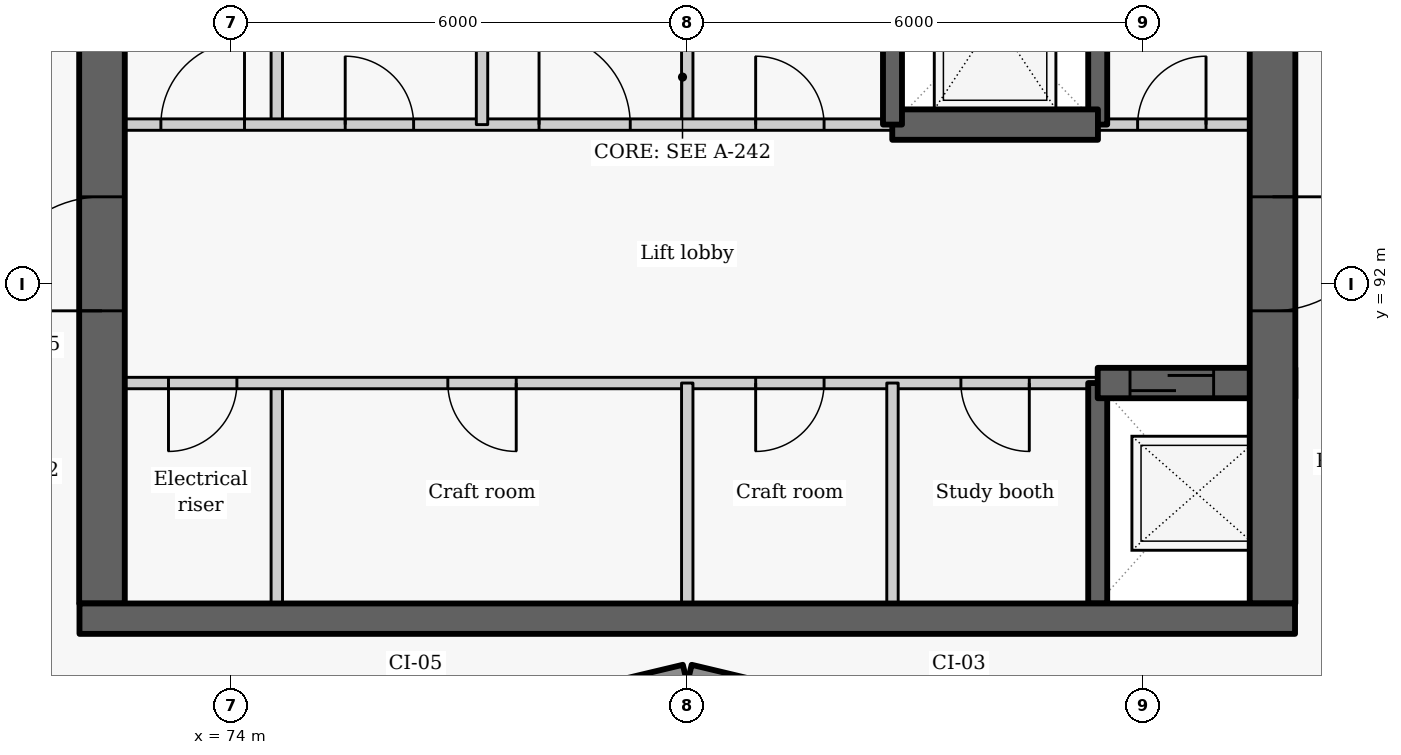
"""IFC4 building model, lengths in metres.
Left out: names, types, materials, properties, quantities, classifications, styles, units other than length and angle.
Written with IfcOpenShell. Run it as: python <this file> out.ifc"""

import sys

from ifc_helpers import new_model, si_unit, direction, frame, frame_2d, origin, place, context, subcontext, project, spatial, rectangle, extrude, element, fill, save


model = new_model("IFC4")
c1 = context("Model", 3, precision=1e-05, world=origin(), true_north=direction((0.0, 1.0)))
c2 = subcontext(c1, "Body", "Model", "MODEL_VIEW")
j1 = project(units=[si_unit("LENGTHUNIT", "METRE"), si_unit("PLANEANGLEUNIT", "RADIAN")], contexts=[c1])
p1 = place(None, origin())
s1 = spatial("IfcSite", under=j1, at=p1, CompositionType="ELEMENT")
p2 = place(p1, origin())
s2 = spatial("IfcBuilding", under=s1, at=p2, CompositionType="ELEMENT")
p3 = place(p2, frame((0.0, 0.0, 249.3)))
s3 = spatial("IfcBuildingStorey", under=s2, at=p3, CompositionType="ELEMENT", Elevation=249.3)
for number, where, z_axis, x_axis in (
    (1, (76.814, 86.119, 0.0), (0.0, 0.0, 1.0), (0.973, 0.232, 0.0)),
    (2, (80.029, 86.872, 0.0), (0.0, 0.0, 1.0), (0.973, -0.232, 0.0)),
):
    element("IfcWall", number, at=place(p3, frame(where, z_axis=z_axis, x_axis=x_axis)), inside=s3, PredefinedType="SOLIDWALL", context=c2, shape_type="SweptSolid", body=[
        extrude(rectangle(XDim=3.246, YDim=0.25, at=frame_2d((1.623, 0.0))), origin(), (0.0, 0.0, 1.0), 2.425),
    ])
p4 = place(p3, frame((74.6, 87.8, 0.0), z_axis=(0.0, 0.0, 1.0), x_axis=(0.0, 1.0, 0.0)))
e3 = element("IfcWall", 3, at=p4, inside=s3, PredefinedType="PARTITIONING", context=c2, shape_type="SweptSolid", body=[
    extrude(rectangle(XDim=2.9, YDim=0.15, at=frame_2d((1.45, 0.0))), origin(), (0.0, 0.0, 1.0), 3.025),
])
p5 = place(p3, frame((74.6, 94.1, 0.0), z_axis=(0.0, 0.0, 1.0), x_axis=(0.0, 1.0, 0.0)))
e4 = element("IfcWall", 4, at=p5, inside=s3, PredefinedType="PARTITIONING", context=c2, shape_type="SweptSolid", body=[
    extrude(rectangle(XDim=2.8, YDim=0.15, at=frame_2d((1.4, 0.0))), origin(), (0.0, 0.0, 1.0), 3.025),
])
p6 = place(p3, frame((85.4, 90.7, 0.0), z_axis=(0.0, 0.0, 1.0), x_axis=(-1.0, 0.0, 0.0)))
e5 = element("IfcWall", 5, at=p6, inside=s3, PredefinedType="PARTITIONING", context=c2, shape_type="SweptSolid", body=[
    extrude(rectangle(XDim=13.4, YDim=0.15, at=frame_2d((6.7, 0.0))), origin(), (0.0, 0.0, 1.0), 3.025),
])
p7 = place(p6, frame((11.325, 0.0, 0.0)))
e6 = element("IfcOpeningElement", 6, at=p7, cuts=e5, PredefinedType="OPENING", context=c2, shape_type="SweptSolid", body=[
    extrude(rectangle(XDim=0.9, YDim=2.1, at=frame_2d((0.45, 1.05))), frame((0.0, 0.085, 0.0), z_axis=(0.0, -1.0, 0.0), x_axis=(1.0, 0.0, 0.0)), (0.0, 0.0, 1.0), 0.17),
])
p8 = place(p6, frame((7.65, 0.0, 0.0)))
e7 = element("IfcOpeningElement", 7, at=p8, cuts=e5, PredefinedType="OPENING", context=c2, shape_type="SweptSolid", body=[
    extrude(rectangle(XDim=0.9, YDim=2.1, at=frame_2d((0.45, 1.05))), frame((0.0, 0.085, 0.0), z_axis=(0.0, -1.0, 0.0), x_axis=(1.0, 0.0, 0.0)), (0.0, 0.0, 1.0), 0.17),
])
p9 = place(p6, frame((3.6, 0.0, 0.0)))
e8 = element("IfcOpeningElement", 8, at=p9, cuts=e5, PredefinedType="OPENING", context=c2, shape_type="SweptSolid", body=[
    extrude(rectangle(XDim=0.9, YDim=2.1, at=frame_2d((0.45, 1.05))), frame((0.0, 0.085, 0.0), z_axis=(0.0, -1.0, 0.0), x_axis=(1.0, 0.0, 0.0)), (0.0, 0.0, 1.0), 0.17),
])
p10 = place(p6, frame((0.9, 0.0, 0.0)))
e9 = element("IfcOpeningElement", 9, at=p10, cuts=e5, PredefinedType="OPENING", context=c2, shape_type="SweptSolid", body=[
    extrude(rectangle(XDim=0.9, YDim=2.1, at=frame_2d((0.45, 1.05))), frame((0.0, 0.085, 0.0), z_axis=(0.0, -1.0, 0.0), x_axis=(1.0, 0.0, 0.0)), (0.0, 0.0, 1.0), 0.17),
])
p11 = place(p3, frame((72.3, 87.8, -0.275), z_axis=(0.0, 0.0, 1.0), x_axis=(0.0, 1.0, 0.0)))
e10 = element("IfcWall", 10, at=p11, inside=s3, PredefinedType="SHEAR", context=c2, shape_type="SweptSolid", body=[
    extrude(rectangle(XDim=9.1, YDim=0.6, at=frame_2d((4.55, 0.0))), origin(), (0.0, 0.0, 1.0), 3.3),
])
p12 = place(p11, frame((3.85, 0.0, 0.275)))
e11 = element("IfcOpeningElement", 11, at=p12, cuts=e10, PredefinedType="OPENING", context=c2, shape_type="SweptSolid", body=[
    extrude(rectangle(XDim=1.5, YDim=2.1, at=frame_2d((0.75, 1.05))), frame((0.0, 0.31, 0.0), z_axis=(0.0, -1.0, 0.0), x_axis=(1.0, 0.0, 0.0)), (0.0, 0.0, 1.0), 0.62),
])
p13 = place(p3, frame((85.4, 87.8, -0.275), z_axis=(0.0, 0.0, 1.0), x_axis=(0.0, 1.0, 0.0)))
e12 = element("IfcWall", 12, at=p13, inside=s3, PredefinedType="SHEAR", context=c2, shape_type="SweptSolid", body=[
    extrude(rectangle(XDim=2.9, YDim=0.25, at=frame_2d((1.45, 0.0))), origin(), (0.0, 0.0, 1.0), 3.3),
])
p14 = place(p3, frame((85.4, 94.1, -0.275), z_axis=(0.0, 0.0, 1.0), x_axis=(0.0, 1.0, 0.0)))
e13 = element("IfcWall", 13, at=p14, inside=s3, PredefinedType="SHEAR", context=c2, shape_type="SweptSolid", body=[
    extrude(rectangle(XDim=2.8, YDim=0.25, at=frame_2d((1.4, 0.0))), origin(), (0.0, 0.0, 1.0), 3.3),
])
p15 = place(p3, frame((85.4, 90.7, -0.275), z_axis=(0.0, 0.0, 1.0), x_axis=(1.0, 0.0, 0.0)))
e14 = element("IfcWall", 14, at=p15, inside=s3, PredefinedType="SHEAR", context=c2, shape_type="SweptSolid", body=[
    extrude(rectangle(XDim=2.6, YDim=0.4, at=frame_2d((1.3, 0.0))), origin(), (0.0, 0.0, 1.0), 3.3),
])
p16 = place(p15, frame((0.425, 0.0, 0.275)))
e15 = element("IfcOpeningElement", 15, at=p16, cuts=e14, PredefinedType="OPENING", context=c2, shape_type="SweptSolid", body=[
    extrude(rectangle(XDim=1.1, YDim=2.1, at=frame_2d((0.55, 1.05))), frame((0.0, 0.21, 0.0), z_axis=(0.0, -1.0, 0.0), x_axis=(1.0, 0.0, 0.0)), (0.0, 0.0, 1.0), 0.42),
])
p17 = place(p3, frame((87.7, 102.05, -0.275), z_axis=(0.0, 0.0, 1.0), x_axis=(0.0, -1.0, 0.0)))
e16 = element("IfcWall", 16, at=p17, inside=s3, PredefinedType="SHEAR", context=c2, shape_type="SweptSolid", body=[
    extrude(rectangle(XDim=14.25, YDim=0.6, at=frame_2d((7.125, 0.0))), origin(), (0.0, 0.0, 1.0), 3.3),
])
p18 = place(p17, frame((8.9, 0.0, 0.275)))
e17 = element("IfcOpeningElement", 17, at=p18, cuts=e16, PredefinedType="OPENING", context=c2, shape_type="SweptSolid", body=[
    extrude(rectangle(XDim=1.5, YDim=2.1, at=frame_2d((0.75, 1.05))), frame((0.0, 0.31, 0.0), z_axis=(0.0, -1.0, 0.0), x_axis=(1.0, 0.0, 0.0)), (0.0, 0.0, 1.0), 0.62),
])
p19 = place(p17, frame((2.025, 0.0, 0.275)))
e18 = element("IfcOpeningElement", 18, at=p19, cuts=e16, PredefinedType="OPENING", context=c2, shape_type="SweptSolid", body=[
    extrude(rectangle(XDim=1.1, YDim=2.1, at=frame_2d((0.55, 1.05))), frame((0.0, 0.31, 0.0), z_axis=(0.0, -1.0, 0.0), x_axis=(1.0, 0.0, 0.0)), (0.0, 0.0, 1.0), 0.62),
])
p20 = place(p3, frame((80.0, 87.8, 0.0), z_axis=(0.0, 0.0, 1.0), x_axis=(0.0, 1.0, 0.0)))
e19 = element("IfcWall", 19, at=p20, inside=s3, PredefinedType="PARTITIONING", context=c2, shape_type="SweptSolid", body=[
    extrude(rectangle(XDim=2.9, YDim=0.15, at=frame_2d((1.45, 0.0))), origin(), (0.0, 0.0, 1.0), 3.025),
])
p21 = place(p3, frame((80.0, 94.1, 0.0), z_axis=(0.0, 0.0, 1.0), x_axis=(0.0, 1.0, 0.0)))
e20 = element("IfcWall", 20, at=p21, inside=s3, PredefinedType="PARTITIONING", context=c2, shape_type="SweptSolid", body=[
    extrude(rectangle(XDim=2.8, YDim=0.15, at=frame_2d((1.4, 0.0))), origin(), (0.0, 0.0, 1.0), 3.025),
])
p22 = place(p3, frame((82.7, 87.8, 0.0), z_axis=(0.0, 0.0, 1.0), x_axis=(0.0, 1.0, 0.0)))
e21 = element("IfcWall", 21, at=p22, inside=s3, PredefinedType="PARTITIONING", context=c2, shape_type="SweptSolid", body=[
    extrude(rectangle(XDim=2.9, YDim=0.15, at=frame_2d((1.45, 0.0))), origin(), (0.0, 0.0, 1.0), 3.025),
])
p23 = place(p3, frame((72.0, 94.1, 0.0), z_axis=(0.0, 0.0, 1.0), x_axis=(1.0, 0.0, 0.0)))
e22 = element("IfcWall", 22, at=p23, inside=s3, PredefinedType="PARTITIONING", context=c2, shape_type="SweptSolid", body=[
    extrude(rectangle(XDim=10.703, YDim=0.15, at=frame_2d((5.352, 0.0))), origin(), (0.0, 0.0, 1.0), 3.025),
])
p24 = place(p23, frame((1.075, 0.0, 0.0)))
e23 = element("IfcOpeningElement", 23, at=p24, cuts=e22, PredefinedType="OPENING", context=c2, shape_type="SweptSolid", body=[
    extrude(rectangle(XDim=1.1, YDim=2.1, at=frame_2d((0.55, 1.05))), frame((0.0, 0.085, 0.0), z_axis=(0.0, -1.0, 0.0), x_axis=(1.0, 0.0, 0.0)), (0.0, 0.0, 1.0), 0.17),
])
p25 = place(p23, frame((3.5, 0.0, 0.0)))
e24 = element("IfcOpeningElement", 24, at=p25, cuts=e22, PredefinedType="OPENING", context=c2, shape_type="SweptSolid", body=[
    extrude(rectangle(XDim=0.9, YDim=2.1, at=frame_2d((0.45, 1.05))), frame((0.0, 0.085, 0.0), z_axis=(0.0, -1.0, 0.0), x_axis=(1.0, 0.0, 0.0)), (0.0, 0.0, 1.0), 0.17),
])
p26 = place(p23, frame((6.05, 0.0, 0.0)))
e25 = element("IfcOpeningElement", 25, at=p26, cuts=e22, PredefinedType="OPENING", context=c2, shape_type="SweptSolid", body=[
    extrude(rectangle(XDim=1.2, YDim=2.1, at=frame_2d((0.6, 1.05))), frame((0.0, 0.085, 0.0), z_axis=(0.0, -1.0, 0.0), x_axis=(1.0, 0.0, 0.0)), (0.0, 0.0, 1.0), 0.17),
])
p27 = place(p23, frame((8.9, 0.0, 0.0)))
e26 = element("IfcOpeningElement", 26, at=p27, cuts=e22, PredefinedType="OPENING", context=c2, shape_type="SweptSolid", body=[
    extrude(rectangle(XDim=0.9, YDim=2.1, at=frame_2d((0.45, 1.05))), frame((0.0, 0.085, 0.0), z_axis=(0.0, -1.0, 0.0), x_axis=(1.0, 0.0, 0.0)), (0.0, 0.0, 1.0), 0.17),
])
p28 = place(p3, frame((85.397, 94.1, 0.0), z_axis=(0.0, 0.0, 1.0), x_axis=(1.0, 0.0, 0.0)))
e27 = element("IfcWall", 27, at=p28, inside=s3, PredefinedType="PARTITIONING", context=c2, shape_type="SweptSolid", body=[
    extrude(rectangle(XDim=2.603, YDim=0.15, at=frame_2d((1.302, 0.0))), origin(), (0.0, 0.0, 1.0), 3.025),
])
p29 = place(p28, frame((0.528, 0.0, 0.0)))
e28 = element("IfcOpeningElement", 28, at=p29, cuts=e27, PredefinedType="OPENING", context=c2, shape_type="SweptSolid", body=[
    extrude(rectangle(XDim=0.9, YDim=2.1, at=frame_2d((0.45, 1.05))), frame((0.0, 0.085, 0.0), z_axis=(0.0, -1.0, 0.0), x_axis=(1.0, 0.0, 0.0)), (0.0, 0.0, 1.0), 0.17),
])
p30 = place(p3, frame((82.697, 94.1, -0.275), z_axis=(0.0, 0.0, 1.0), x_axis=(1.0, 0.0, 0.0)))
e29 = element("IfcWall", 29, at=p30, inside=s3, PredefinedType="SHEAR", context=c2, shape_type="SweptSolid", body=[
    extrude(rectangle(XDim=2.706, YDim=0.4, at=frame_2d((1.353, 0.0))), origin(), (0.0, 0.0, 1.0), 3.3),
])
p31 = place(p3, frame((77.3, 94.1, 0.0), z_axis=(0.0, 0.0, 1.0), x_axis=(0.0, 1.0, 0.0)))
e30 = element("IfcWall", 30, at=p31, inside=s3, PredefinedType="PARTITIONING", context=c2, shape_type="SweptSolid", body=[
    extrude(rectangle(XDim=2.8, YDim=0.15, at=frame_2d((1.4, 0.0))), origin(), (0.0, 0.0, 1.0), 3.025),
])
p32 = place(p3, frame((82.7, 94.1, -0.275), z_axis=(0.0, 0.0, 1.0), x_axis=(0.0, 1.0, 0.0)))
e31 = element("IfcWall", 31, at=p32, inside=s3, PredefinedType="SHEAR", context=c2, shape_type="SweptSolid", body=[
    extrude(rectangle(XDim=2.8, YDim=0.25, at=frame_2d((1.4, 0.0))), origin(), (0.0, 0.0, 1.0), 3.3),
])
p33 = place(p3, frame((72.004, 87.6, -0.275), z_axis=(0.0, 0.0, 1.0), x_axis=(1.0, 0.0, 0.0)))
e32 = element("IfcWall", 32, at=p33, inside=s3, PredefinedType="SHEAR", context=c2, shape_type="SweptSolid", body=[
    extrude(rectangle(XDim=15.992, YDim=0.4, at=frame_2d((7.996, 0.0))), origin(), (0.0, 0.0, 1.0), 3.3),
])
p34 = place(p7, origin())
e33 = element("IfcDoor", 33, at=p34, inside=s3, OperationType="SINGLE_SWING_RIGHT", PredefinedType="DOOR", context=c2, shape_type="SweptSolid", body=[
    extrude(rectangle(XDim=0.9, YDim=2.1, at=frame_2d((0.45, 1.05))), frame((0.0, 0.025, 0.0), z_axis=(0.0, -1.0, 0.0), x_axis=(1.0, 0.0, 0.0)), (0.0, 0.0, 1.0), 0.05),
])
fill(e6, e33)
p35 = place(p16, origin())
e34 = element("IfcDoor", 34, at=p35, inside=s3, OperationType="SLIDING_TO_LEFT", PredefinedType="DOOR", context=c2, shape_type="SweptSolid", body=[
    extrude(rectangle(XDim=1.1, YDim=2.1, at=frame_2d((0.55, 1.05))), frame((0.0, 0.025, 0.0), z_axis=(0.0, -1.0, 0.0), x_axis=(1.0, 0.0, 0.0)), (0.0, 0.0, 1.0), 0.05),
])
fill(e15, e34)
p36 = place(p8, origin())
e35 = element("IfcDoor", 35, at=p36, inside=s3, OperationType="SINGLE_SWING_LEFT", PredefinedType="DOOR", context=c2, shape_type="SweptSolid", body=[
    extrude(rectangle(XDim=0.9, YDim=2.1, at=frame_2d((0.45, 1.05))), frame((0.0, 0.025, 0.0), z_axis=(0.0, -1.0, 0.0), x_axis=(1.0, 0.0, 0.0)), (0.0, 0.0, 1.0), 0.05),
])
fill(e7, e35)
p37 = place(p9, origin())
e36 = element("IfcDoor", 36, at=p37, inside=s3, OperationType="SINGLE_SWING_RIGHT", PredefinedType="DOOR", context=c2, shape_type="SweptSolid", body=[
    extrude(rectangle(XDim=0.9, YDim=2.1, at=frame_2d((0.45, 1.05))), frame((0.0, 0.025, 0.0), z_axis=(0.0, -1.0, 0.0), x_axis=(1.0, 0.0, 0.0)), (0.0, 0.0, 1.0), 0.05),
])
fill(e8, e36)
p38 = place(p10, origin())
e37 = element("IfcDoor", 37, at=p38, inside=s3, OperationType="SINGLE_SWING_LEFT", PredefinedType="DOOR", context=c2, shape_type="SweptSolid", body=[
    extrude(rectangle(XDim=0.9, YDim=2.1, at=frame_2d((0.45, 1.05))), frame((0.0, 0.025, 0.0), z_axis=(0.0, -1.0, 0.0), x_axis=(1.0, 0.0, 0.0)), (0.0, 0.0, 1.0), 0.05),
])
fill(e9, e37)
p39 = place(p24, origin())
e38 = element("IfcDoor", 38, at=p39, inside=s3, OperationType="SINGLE_SWING_RIGHT", PredefinedType="DOOR", context=c2, shape_type="SweptSolid", body=[
    extrude(rectangle(XDim=1.1, YDim=2.1, at=frame_2d((0.55, 1.05))), frame((0.0, 0.025, 0.0), z_axis=(0.0, -1.0, 0.0), x_axis=(1.0, 0.0, 0.0)), (0.0, 0.0, 1.0), 0.05),
])
fill(e23, e38)
p40 = place(p25, origin())
e39 = element("IfcDoor", 39, at=p40, inside=s3, OperationType="SINGLE_SWING_LEFT", PredefinedType="DOOR", context=c2, shape_type="SweptSolid", body=[
    extrude(rectangle(XDim=0.9, YDim=2.1, at=frame_2d((0.45, 1.05))), frame((0.0, 0.025, 0.0), z_axis=(0.0, -1.0, 0.0), x_axis=(1.0, 0.0, 0.0)), (0.0, 0.0, 1.0), 0.05),
])
fill(e24, e39)
p41 = place(p26, origin())
e40 = element("IfcDoor", 40, at=p41, inside=s3, OperationType="DOUBLE_DOOR_SINGLE_SWING", PredefinedType="DOOR", context=c2, shape_type="SweptSolid", body=[
    extrude(rectangle(XDim=1.2, YDim=2.1, at=frame_2d((0.6, 1.05))), frame((0.0, 0.025, 0.0), z_axis=(0.0, -1.0, 0.0), x_axis=(1.0, 0.0, 0.0)), (0.0, 0.0, 1.0), 0.05),
])
fill(e25, e40)
p42 = place(p27, origin())
e41 = element("IfcDoor", 41, at=p42, inside=s3, OperationType="SINGLE_SWING_LEFT", PredefinedType="DOOR", context=c2, shape_type="SweptSolid", body=[
    extrude(rectangle(XDim=0.9, YDim=2.1, at=frame_2d((0.45, 1.05))), frame((0.0, 0.025, 0.0), z_axis=(0.0, -1.0, 0.0), x_axis=(1.0, 0.0, 0.0)), (0.0, 0.0, 1.0), 0.05),
])
fill(e26, e41)
p43 = place(p29, origin())
e42 = element("IfcDoor", 42, at=p43, inside=s3, OperationType="SINGLE_SWING_RIGHT", PredefinedType="DOOR", context=c2, shape_type="SweptSolid", body=[
    extrude(rectangle(XDim=0.9, YDim=2.1, at=frame_2d((0.45, 1.05))), frame((0.0, 0.025, 0.0), z_axis=(0.0, -1.0, 0.0), x_axis=(1.0, 0.0, 0.0)), (0.0, 0.0, 1.0), 0.05),
])
fill(e28, e42)
p44 = place(p18, origin())
e43 = element("IfcDoor", 43, at=p44, inside=s3, OperationType="DOUBLE_DOOR_SINGLE_SWING", PredefinedType="DOOR", context=c2, shape_type="SweptSolid", body=[
    extrude(rectangle(XDim=1.5, YDim=2.1, at=frame_2d((0.75, 1.05))), frame((0.0, 0.025, 0.0), z_axis=(0.0, -1.0, 0.0), x_axis=(1.0, 0.0, 0.0)), (0.0, 0.0, 1.0), 0.05),
])
fill(e17, e43)
p45 = place(p12, origin())
e44 = element("IfcDoor", 44, at=p45, inside=s3, OperationType="DOUBLE_DOOR_SINGLE_SWING", PredefinedType="DOOR", context=c2, shape_type="SweptSolid", body=[
    extrude(rectangle(XDim=1.5, YDim=2.1, at=frame_2d((0.75, 1.05))), frame((0.0, 0.025, 0.0), z_axis=(0.0, -1.0, 0.0), x_axis=(1.0, 0.0, 0.0)), (0.0, 0.0, 1.0), 0.05),
])
fill(e11, e44)
save(model, sys.argv[1])
